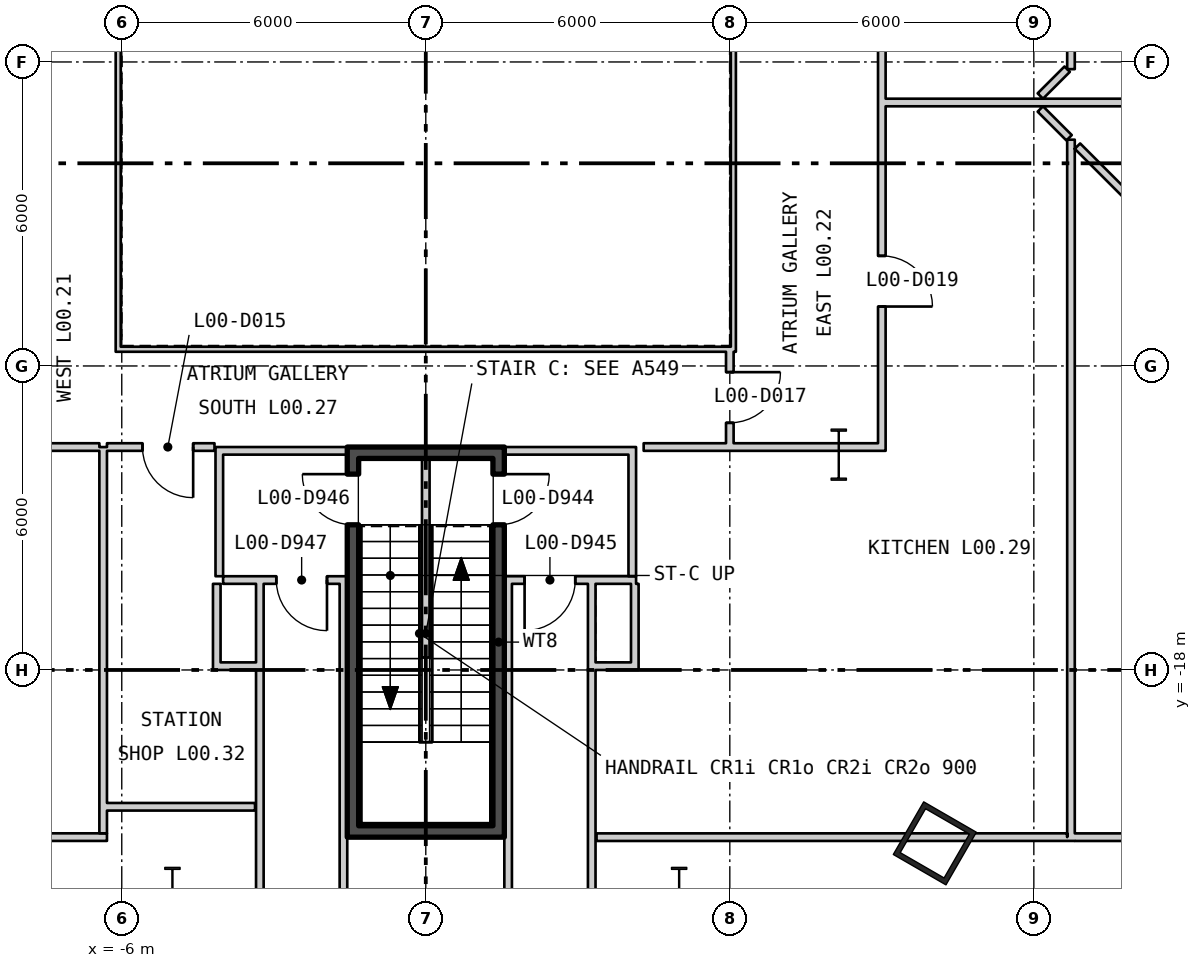
"""IFC4 building model, lengths in metres.
Left out: names, types, materials, properties, quantities, classifications, styles, units other than length and angle.
Written with IfcOpenShell. Run it as: python <this file> out.ifc"""

import sys

from ifc_helpers import new_model, si_unit, direction, frame, frame_2d, origin, origin_2d, place, context, subcontext, project, spatial, rectangle, hollow_rectangle, i_section, extrude, element, fill, save


model = new_model("IFC4")
c1 = context("Model", 3, precision=1e-05, world=origin(), true_north=direction((0.0, 1.0)))
c2 = subcontext(c1, "Body", "Model", "MODEL_VIEW")
j1 = project(units=[si_unit("LENGTHUNIT", "METRE"), si_unit("PLANEANGLEUNIT", "RADIAN")], contexts=[c1])
p1 = place(None, origin())
s1 = spatial("IfcSite", under=j1, at=p1, CompositionType="ELEMENT")
p2 = place(p1, origin())
s2 = spatial("IfcBuilding", under=s1, at=p2, CompositionType="ELEMENT")
p3 = place(p2, origin())
s3 = spatial("IfcBuildingStorey", under=s2, at=p3, CompositionType="ELEMENT", Elevation=0.0)
p4 = place(p3, frame((10.046, -21.422, 0.0), z_axis=(0.0, 0.0, 1.0), x_axis=(0.5, 0.866025403784, 0.0)))
e1 = element("IfcColumn", 1, at=p4, inside=s3, PredefinedType="COLUMN", context=c2, shape_type="SweptSolid", body=[
    extrude(hollow_rectangle(XDim=1.2, YDim=1.2, WallThickness=0.1, at=origin_2d()), origin(), (0.0, 0.0, 1.0), 8.4),
])
for number, where, z_axis, x_axis in (
    (2, (8.15, -13.75, 0.0), (0.0, 0.0, 1.0), (1.0, 0.0, 0.0)),
    (3, (5.0, -22.4, 0.0), (0.0, 0.0, 1.0), (1.0, 0.0, 0.0)),
    (4, (-5.0, -22.4, 0.0), (0.0, 0.0, 1.0), (1.0, 0.0, 0.0)),
):
    element("IfcColumn", number, at=place(p3, frame(where, z_axis=z_axis, x_axis=x_axis)), inside=s3, PredefinedType="COLUMN", context=c2, shape_type="SweptSolid", body=[
        extrude(i_section(OverallWidth=0.302, OverallDepth=1.008, WebThickness=0.021, FlangeThickness=0.04, at=origin_2d()), origin(), (0.0, 0.0, 1.0), 8.4),
    ])
p5 = place(p3, frame((-6.12, -11.67, 0.0), z_axis=(0.0, 0.0, 1.0), x_axis=(1.0, 0.0, 0.0)))
e5 = element("IfcWall", 5, at=p5, inside=s3, PredefinedType="PARTITIONING", context=c2, shape_type="SweptSolid", body=[
    extrude(rectangle(XDim=12.24, YDim=0.1, at=frame_2d((6.12, 0.0))), origin(), (0.0, 0.0, 1.0), 8.18),
])
for number, where, z_axis, x_axis in (
    (6, (6.07, -11.62, 0.0), (0.0, 0.0, 1.0), (0.0, 1.0, 0.0)),
    (7, (-6.07, -3.58, 0.0), (0.0, 0.0, 1.0), (0.0, -1.0, 0.0)),
):
    element("IfcWall", number, at=place(p3, frame(where, z_axis=z_axis, x_axis=x_axis)), inside=s3, PredefinedType="PARTITIONING", context=c2, shape_type="SweptSolid", body=[
        extrude(rectangle(XDim=8.04, YDim=0.1, at=frame_2d((4.02, 0.0))), origin(), (0.0, 0.0, 1.0), 8.18),
    ])
p6 = place(p3, frame((-1.438, -21.075, 0.0), z_axis=(0.0, 0.0, 1.0), x_axis=(0.0, 1.0, 0.0)))
e8 = element("IfcWall", 8, at=p6, inside=s3, PredefinedType="SHEAR", context=c2, shape_type="SweptSolid", body=[
    extrude(rectangle(XDim=7.25, YDim=0.225, at=frame_2d((3.625, 0.0))), origin(), (0.0, 0.0, 1.0), 8.18),
])
p7 = place(p6, frame((5.94, 0.0, 0.0)))
e9 = element("IfcOpeningElement", 9, at=p7, cuts=e8, PredefinedType="OPENING", context=c2, shape_type="SweptSolid", body=[
    extrude(rectangle(XDim=1.0, YDim=2.1, at=frame_2d((0.5, 1.05))), frame((0.0, 0.122, 0.0), z_axis=(0.0, -1.0, 0.0), x_axis=(1.0, 0.0, 0.0)), (0.0, 0.0, 1.0), 0.245),
])
p8 = place(p3, frame((1.438, -21.075, 0.0), z_axis=(0.0, 0.0, 1.0), x_axis=(0.0, 1.0, 0.0)))
e10 = element("IfcWall", 10, at=p8, inside=s3, PredefinedType="SHEAR", context=c2, shape_type="SweptSolid", body=[
    extrude(rectangle(XDim=7.25, YDim=0.225, at=frame_2d((3.625, 0.0))), origin(), (0.0, 0.0, 1.0), 8.18),
])
p9 = place(p8, frame((5.94, 0.0, 0.0)))
e11 = element("IfcOpeningElement", 11, at=p9, cuts=e10, PredefinedType="OPENING", context=c2, shape_type="SweptSolid", body=[
    extrude(rectangle(XDim=1.0, YDim=2.1, at=frame_2d((0.5, 1.05))), frame((0.0, 0.122, 0.0), z_axis=(0.0, -1.0, 0.0), x_axis=(1.0, 0.0, 0.0)), (0.0, 0.0, 1.0), 0.245),
])
for number, where, z_axis, x_axis in (
    (12, (-1.55, -21.188, 0.0), (0.0, 0.0, 1.0), (1.0, 0.0, 0.0)),
    (13, (-1.55, -13.713, 0.0), (0.0, 0.0, 1.0), (1.0, 0.0, 0.0)),
):
    element("IfcWall", number, at=place(p3, frame(where, z_axis=z_axis, x_axis=x_axis)), inside=s3, PredefinedType="SHEAR", context=c2, shape_type="SweptSolid", body=[
        extrude(rectangle(XDim=3.1, YDim=0.225, at=frame_2d((1.55, 0.0))), origin(), (0.0, 0.0, 1.0), 8.18),
    ])
p10 = place(p3, frame((0.0, -17.755, 0.0), z_axis=(0.0, 0.0, 1.0), x_axis=(0.0, 1.0, 0.0)))
e14 = element("IfcWall", 14, at=p10, inside=s3, PredefinedType="PARTITIONING", context=c2, shape_type="SweptSolid", body=[
    extrude(rectangle(XDim=3.93, YDim=0.15, at=frame_2d((1.965, 0.0))), origin(), (0.0, 0.0, 1.0), 4.0),
])
p11 = place(p3, frame((1.55, -16.225, 0.0), z_axis=(0.0, 0.0, 1.0), x_axis=(1.0, 0.0, 0.0)))
e15 = element("IfcWall", 15, at=p11, inside=s3, PredefinedType="PARTITIONING", context=c2, shape_type="SweptSolid", body=[
    extrude(rectangle(XDim=2.6, YDim=0.15, at=frame_2d((1.3, 0.0))), origin(), (0.0, 0.0, 1.0), 8.18),
])
p12 = place(p11, frame((0.4, 0.0, 0.0)))
e16 = element("IfcOpeningElement", 16, at=p12, cuts=e15, PredefinedType="OPENING", context=c2, shape_type="SweptSolid", body=[
    extrude(rectangle(XDim=1.0, YDim=2.4, at=frame_2d((0.5, 1.2))), frame((0.0, 0.085, 0.0), z_axis=(0.0, -1.0, 0.0), x_axis=(1.0, 0.0, 0.0)), (0.0, 0.0, 1.0), 0.17),
])
p13 = place(p3, frame((4.075, -16.15, 0.0), z_axis=(0.0, 0.0, 1.0), x_axis=(0.0, 1.0, 0.0)))
e17 = element("IfcWall", 17, at=p13, inside=s3, PredefinedType="PARTITIONING", context=c2, shape_type="SweptSolid", body=[
    extrude(rectangle(XDim=2.4, YDim=0.15, at=frame_2d((1.2, 0.0))), origin(), (0.0, 0.0, 1.0), 8.18),
])
p14 = place(p3, frame((1.55, -13.675, 0.0), z_axis=(0.0, 0.0, 1.0), x_axis=(1.0, 0.0, 0.0)))
e18 = element("IfcWall", 18, at=p14, inside=s3, PredefinedType="PARTITIONING", context=c2, shape_type="SweptSolid", body=[
    extrude(rectangle(XDim=2.6, YDim=0.15, at=frame_2d((1.3, 0.0))), origin(), (0.0, 0.0, 1.0), 7.27),
])
p15 = place(p3, frame((3.35, -17.925, 0.0), z_axis=(0.0, 0.0, 1.0), x_axis=(1.0, 0.0, 0.0)))
e19 = element("IfcWall", 19, at=p15, inside=s3, PredefinedType="PARTITIONING", context=c2, shape_type="SweptSolid", body=[
    extrude(rectangle(XDim=0.7, YDim=0.15, at=frame_2d((0.35, 0.0))), origin(), (0.0, 0.0, 1.0), 8.18),
])
p16 = place(p3, frame((4.125, -18.0, 0.0), z_axis=(0.0, 0.0, 1.0), x_axis=(0.0, 1.0, 0.0)))
e20 = element("IfcWall", 20, at=p16, inside=s3, PredefinedType="PARTITIONING", context=c2, shape_type="SweptSolid", body=[
    extrude(rectangle(XDim=1.7, YDim=0.15, at=frame_2d((0.85, 0.0))), origin(), (0.0, 0.0, 1.0), 8.18),
])
p17 = place(p3, frame((1.625, -33.35, 0.0), z_axis=(0.0, 0.0, 1.0), x_axis=(0.0, 1.0, 0.0)))
e21 = element("IfcWall", 21, at=p17, inside=s3, PredefinedType="PARTITIONING", context=c2, shape_type="SweptSolid", body=[
    extrude(rectangle(XDim=17.05, YDim=0.15, at=frame_2d((8.525, 0.0))), origin(), (0.0, 0.0, 1.0), 8.18),
])
p18 = place(p3, frame((3.275, -32.9, 0.0), z_axis=(0.0, 0.0, 1.0), x_axis=(0.0, 1.0, 0.0)))
e22 = element("IfcWall", 22, at=p18, inside=s3, PredefinedType="PARTITIONING", context=c2, shape_type="SweptSolid", body=[
    extrude(rectangle(XDim=16.6, YDim=0.15, at=frame_2d((8.3, 0.0))), origin(), (0.0, 0.0, 1.0), 7.58),
])
p19 = place(p3, frame((-4.0, -16.225, 0.0), z_axis=(0.0, 0.0, 1.0), x_axis=(1.0, 0.0, 0.0)))
e23 = element("IfcWall", 23, at=p19, inside=s3, PredefinedType="PARTITIONING", context=c2, shape_type="SweptSolid", body=[
    extrude(rectangle(XDim=2.45, YDim=0.15, at=frame_2d((1.225, 0.0))), origin(), (0.0, 0.0, 1.0), 8.18),
])
p20 = place(p19, frame((1.05, 0.0, 0.0)))
e24 = element("IfcOpeningElement", 24, at=p20, cuts=e23, PredefinedType="OPENING", context=c2, shape_type="SweptSolid", body=[
    extrude(rectangle(XDim=1.0, YDim=2.4, at=frame_2d((0.5, 1.2))), frame((0.0, 0.085, 0.0), z_axis=(0.0, -1.0, 0.0), x_axis=(1.0, 0.0, 0.0)), (0.0, 0.0, 1.0), 0.17),
])
p21 = place(p3, frame((-4.075, -16.15, 0.0), z_axis=(0.0, 0.0, 1.0), x_axis=(0.0, 1.0, 0.0)))
e25 = element("IfcWall", 25, at=p21, inside=s3, PredefinedType="PARTITIONING", context=c2, shape_type="SweptSolid", body=[
    extrude(rectangle(XDim=2.4, YDim=0.15, at=frame_2d((1.2, 0.0))), origin(), (0.0, 0.0, 1.0), 8.18),
])
p22 = place(p3, frame((-4.15, -13.675, 0.0), z_axis=(0.0, 0.0, 1.0), x_axis=(1.0, 0.0, 0.0)))
e26 = element("IfcWall", 26, at=p22, inside=s3, PredefinedType="PARTITIONING", context=c2, shape_type="SweptSolid", body=[
    extrude(rectangle(XDim=2.6, YDim=0.15, at=frame_2d((1.3, 0.0))), origin(), (0.0, 0.0, 1.0), 7.27),
])
p23 = place(p3, frame((-3.275, -32.9, 0.0), z_axis=(0.0, 0.0, 1.0), x_axis=(0.0, 1.0, 0.0)))
e27 = element("IfcWall", 27, at=p23, inside=s3, PredefinedType="PARTITIONING", context=c2, shape_type="SweptSolid", body=[
    extrude(rectangle(XDim=16.6, YDim=0.15, at=frame_2d((8.3, 0.0))), origin(), (0.0, 0.0, 1.0), 7.58),
])
p24 = place(p3, frame((-1.625, -33.35, 0.0), z_axis=(0.0, 0.0, 1.0), x_axis=(0.0, 1.0, 0.0)))
e28 = element("IfcWall", 28, at=p24, inside=s3, PredefinedType="PARTITIONING", context=c2, shape_type="SweptSolid", body=[
    extrude(rectangle(XDim=17.05, YDim=0.15, at=frame_2d((8.525, 0.0))), origin(), (0.0, 0.0, 1.0), 8.18),
])
p25 = place(p3, frame((-4.125, -18.0, 0.0), z_axis=(0.0, 0.0, 1.0), x_axis=(0.0, 1.0, 0.0)))
e29 = element("IfcWall", 29, at=p25, inside=s3, PredefinedType="PARTITIONING", context=c2, shape_type="SweptSolid", body=[
    extrude(rectangle(XDim=1.7, YDim=0.15, at=frame_2d((0.85, 0.0))), origin(), (0.0, 0.0, 1.0), 8.18),
])
p26 = place(p3, frame((-4.05, -17.925, 0.0), z_axis=(0.0, 0.0, 1.0), x_axis=(1.0, 0.0, 0.0)))
e30 = element("IfcWall", 30, at=p26, inside=s3, PredefinedType="PARTITIONING", context=c2, shape_type="SweptSolid", body=[
    extrude(rectangle(XDim=0.7, YDim=0.15, at=frame_2d((0.35, 0.0))), origin(), (0.0, 0.0, 1.0), 8.18),
])
p27 = place(p3, frame((-17.425, -21.3, 0.0), z_axis=(0.0, 0.0, 1.0), x_axis=(0.999999995966, 8.9823048e-05, 0.0)))
e31 = element("IfcWall", 31, at=p27, inside=s3, PredefinedType="PARTITIONING", context=c2, shape_type="SweptSolid", body=[
    extrude(rectangle(XDim=11.133, YDim=0.15, at=frame_2d((5.566, 0.0))), origin(), (0.0, 0.0, 1.0), 8.18),
])
p28 = place(p3, frame((-8.15, -13.6, 0.0), z_axis=(0.0, 0.0, 1.0), x_axis=(1.0, 0.0, 0.0)))
e32 = element("IfcWall", 32, at=p28, inside=s3, PredefinedType="PARTITIONING", context=c2, shape_type="SweptSolid", body=[
    extrude(rectangle(XDim=1.708, YDim=0.15, at=frame_2d((0.854, 0.0))), origin(), (0.0, 0.0, 1.0), 7.27),
])
p29 = place(p3, frame((-6.367, -21.224, 0.0), z_axis=(0.0, 0.0, 1.0), x_axis=(0.0, 1.0, 0.0)))
e33 = element("IfcWall", 33, at=p29, inside=s3, PredefinedType="PARTITIONING", context=c2, shape_type="SweptSolid", body=[
    extrude(rectangle(XDim=7.623, YDim=0.15, at=frame_2d((3.812, 0.0))), origin(), (0.0, 0.0, 1.0), 7.58),
])
p30 = place(p3, frame((-6.292, -20.7, 0.0), z_axis=(0.0, 0.0, 1.0), x_axis=(1.0, 0.0, 0.0)))
e34 = element("IfcWall", 34, at=p30, inside=s3, PredefinedType="PARTITIONING", context=c2, shape_type="SweptSolid", body=[
    extrude(rectangle(XDim=2.922, YDim=0.15, at=frame_2d((1.461, 0.0))), origin(), (0.0, 0.0, 1.0), 8.18),
])
p31 = place(p3, frame((-6.292, -13.6, 0.0), z_axis=(0.0, 0.0, 1.0), x_axis=(1.0, 0.0, 0.0)))
e35 = element("IfcWall", 35, at=p31, inside=s3, PredefinedType="PARTITIONING", context=c2, shape_type="SweptSolid", body=[
    extrude(rectangle(XDim=2.122, YDim=0.15, at=frame_2d((1.061, 0.0))), origin(), (0.0, 0.0, 1.0), 7.27),
])
p32 = place(p31, frame((0.701, 0.0, 0.0)))
e36 = element("IfcOpeningElement", 36, at=p32, cuts=e35, PredefinedType="OPENING", context=c2, shape_type="SweptSolid", body=[
    extrude(rectangle(XDim=1.0, YDim=2.1, at=frame_2d((0.5, 1.05))), frame((0.0, 0.085, 0.0), z_axis=(0.0, -1.0, 0.0), x_axis=(1.0, 0.0, 0.0)), (0.0, 0.0, 1.0), 0.17),
])
p33 = place(p3, frame((3.37, -21.3, 0.0), z_axis=(0.0, 0.0, 1.0), x_axis=(0.999999994204, 0.000107665805, 0.0)))
e37 = element("IfcWall", 37, at=p33, inside=s3, PredefinedType="PARTITIONING", context=c2, shape_type="SweptSolid", body=[
    extrude(rectangle(XDim=9.288, YDim=0.15, at=frame_2d((4.644, 0.0))), origin(), (0.0, 0.0, 1.0), 8.18),
])
p34 = place(p3, frame((4.3, -13.6, 0.0), z_axis=(0.0, 0.0, 1.0), x_axis=(1.0, 0.0, 0.0)))
e38 = element("IfcWall", 38, at=p34, inside=s3, PredefinedType="PARTITIONING", context=c2, shape_type="SweptSolid", body=[
    extrude(rectangle(XDim=3.85, YDim=0.15, at=frame_2d((1.925, 0.0))), origin(), (0.0, 0.0, 1.0), 7.27),
])
p35 = place(p3, frame((8.15, -13.6, 0.0), z_axis=(0.0, 0.0, 1.0), x_axis=(1.0, 0.0, 0.0)))
e39 = element("IfcWall", 39, at=p35, inside=s3, PredefinedType="PARTITIONING", context=c2, shape_type="SweptSolid", body=[
    extrude(rectangle(XDim=0.775, YDim=0.15, at=frame_2d((0.388, 0.0))), origin(), (0.0, 0.0, 1.0), 7.39),
])
p36 = place(p3, frame((6.0, -13.525, 0.0), z_axis=(0.0, 0.0, 1.0), x_axis=(0.0, 1.0, 0.0)))
e40 = element("IfcWall", 40, at=p36, inside=s3, PredefinedType="PARTITIONING", context=c2, shape_type="SweptSolid", body=[
    extrude(rectangle(XDim=1.805, YDim=0.15, at=frame_2d((0.902, 0.0))), origin(), (0.0, 0.0, 1.0), 8.18),
])
p37 = place(p36, frame((0.403, 0.0, 0.0)))
e41 = element("IfcOpeningElement", 41, at=p37, cuts=e40, PredefinedType="OPENING", context=c2, shape_type="SweptSolid", body=[
    extrude(rectangle(XDim=1.0, YDim=2.1, at=frame_2d((0.5, 1.05))), frame((0.0, 0.085, 0.0), z_axis=(0.0, -1.0, 0.0), x_axis=(1.0, 0.0, 0.0)), (0.0, 0.0, 1.0), 0.17),
])
p38 = place(p3, frame((9.0, -13.675, 0.0), z_axis=(0.0, 0.0, 1.0), x_axis=(0.0, 1.0, 0.0)))
e42 = element("IfcWall", 42, at=p38, inside=s3, PredefinedType="PARTITIONING", context=c2, shape_type="SweptSolid", body=[
    extrude(rectangle(XDim=11.287, YDim=0.15, at=frame_2d((5.644, 0.0))), origin(), (0.0, 0.0, 1.0), 8.18),
])
p39 = place(p38, frame((2.848, 0.0, 0.0)))
e43 = element("IfcOpeningElement", 43, at=p39, cuts=e42, PredefinedType="OPENING", context=c2, shape_type="SweptSolid", body=[
    extrude(rectangle(XDim=1.0, YDim=2.1, at=frame_2d((0.5, 1.05))), frame((0.0, 0.085, 0.0), z_axis=(0.0, -1.0, 0.0), x_axis=(1.0, 0.0, 0.0)), (0.0, 0.0, 1.0), 0.17),
])
p40 = place(p3, frame((9.075, -6.8, 0.0), z_axis=(0.0, 0.0, 1.0), x_axis=(1.0, 0.0, 0.0)))
e44 = element("IfcWall", 44, at=p40, inside=s3, PredefinedType="PARTITIONING", context=c2, shape_type="SweptSolid", body=[
    extrude(rectangle(XDim=7.95, YDim=0.15, at=frame_2d((3.975, 0.0))), origin(), (0.0, 0.0, 1.0), 8.18),
])
p41 = place(p3, frame((12.128, -6.928, 0.0), z_axis=(0.0, 0.0, 1.0), x_axis=(0.707106781187, -0.707106781187, 0.0)))
e45 = element("IfcWall", 45, at=p41, inside=s3, PredefinedType="PARTITIONING", context=c2, shape_type="SweptSolid", body=[
    extrude(rectangle(XDim=0.803, YDim=0.15, at=frame_2d((0.402, 0.0))), origin(), (0.0, 0.0, 1.0), 8.18),
])
p42 = place(p3, frame((12.128, -6.672, 0.0), z_axis=(0.0, 0.0, 1.0), x_axis=(0.707106781187, 0.707106781187, 0.0)))
e46 = element("IfcWall", 46, at=p42, inside=s3, PredefinedType="PARTITIONING", context=c2, shape_type="SweptSolid", body=[
    extrude(rectangle(XDim=0.75, YDim=0.15, at=frame_2d((0.375, 0.0))), origin(), (0.0, 0.0, 1.0), 8.18),
])
p43 = place(p3, frame((12.733, -21.374, 0.0), z_axis=(0.0, 0.0, 1.0), x_axis=(0.0, 1.0, 0.0)))
e47 = element("IfcWall", 47, at=p43, inside=s3, PredefinedType="PARTITIONING", context=c2, shape_type="SweptSolid", body=[
    extrude(rectangle(XDim=1.575, YDim=0.15, at=frame_2d((0.787, 0.0))), origin(), (0.0, 0.0, 1.0), 7.49),
])
p44 = place(p3, frame((12.733, -19.799, 0.0), z_axis=(0.0, 0.0, 1.0), x_axis=(0.0, 1.0, 0.0)))
e48 = element("IfcWall", 48, at=p44, inside=s3, PredefinedType="PARTITIONING", context=c2, shape_type="SweptSolid", body=[
    extrude(rectangle(XDim=2.832, YDim=0.15, at=frame_2d((1.416, 0.0))), origin(), (0.0, 0.0, 1.0), 7.58),
])
p45 = place(p3, frame((12.733, -16.967, 0.0), z_axis=(0.0, 0.0, 1.0), x_axis=(0.0, 1.0, 0.0)))
e49 = element("IfcWall", 49, at=p45, inside=s3, PredefinedType="PARTITIONING", context=c2, shape_type="SweptSolid", body=[
    extrude(rectangle(XDim=0.4, YDim=0.15, at=frame_2d((0.2, 0.0))), origin(), (0.0, 0.0, 1.0), 8.18),
])
p46 = place(p3, frame((12.733, -16.567, 0.0), z_axis=(0.0, 0.0, 1.0), x_axis=(0.0, 1.0, 0.0)))
e50 = element("IfcWall", 50, at=p46, inside=s3, PredefinedType="PARTITIONING", context=c2, shape_type="SweptSolid", body=[
    extrude(rectangle(XDim=2.717, YDim=0.15, at=frame_2d((1.359, 0.0))), origin(), (0.0, 0.0, 1.0), 7.58),
])
p47 = place(p3, frame((12.733, -13.85, 0.0), z_axis=(0.0, 0.0, 1.0), x_axis=(0.0, 1.0, 0.0)))
e51 = element("IfcWall", 51, at=p47, inside=s3, PredefinedType="PARTITIONING", context=c2, shape_type="SweptSolid", body=[
    extrude(rectangle(XDim=6.316, YDim=0.15, at=frame_2d((3.158, 0.0))), origin(), (0.0, 0.0, 1.0), 7.49),
])
p48 = place(p3, frame((12.733, -6.142, 0.0), z_axis=(0.0, 0.0, 1.0), x_axis=(0.0, 1.0, 0.0)))
e52 = element("IfcWall", 52, at=p48, inside=s3, PredefinedType="PARTITIONING", context=c2, shape_type="SweptSolid", body=[
    extrude(rectangle(XDim=3.042, YDim=0.15, at=frame_2d((1.521, 0.0))), origin(), (0.0, 0.0, 1.0), 7.49),
])
p49 = place(p3, frame((12.808, -21.3, 0.0), z_axis=(0.0, 0.0, 1.0), x_axis=(1.0, 0.0, 0.0)))
e53 = element("IfcWall", 53, at=p49, inside=s3, PredefinedType="PARTITIONING", context=c2, shape_type="SweptSolid", body=[
    extrude(rectangle(XDim=4.617, YDim=0.15, at=frame_2d((2.308, 0.0))), origin(), (0.0, 0.0, 1.0), 8.18),
])
p50 = place(p49, frame((1.758, 0.0, 0.0)))
e54 = element("IfcOpeningElement", 54, at=p50, cuts=e53, PredefinedType="OPENING", context=c2, shape_type="SweptSolid", body=[
    extrude(rectangle(XDim=1.0, YDim=2.1, at=frame_2d((0.5, 1.05))), frame((0.0, 0.085, 0.0), z_axis=(0.0, -1.0, 0.0), x_axis=(1.0, 0.0, 0.0)), (0.0, 0.0, 1.0), 0.17),
])
p51 = place(p3, frame((12.861, -7.661, 0.0), z_axis=(0.0, 0.0, 1.0), x_axis=(0.707106781187, -0.707106781187, 0.0)))
e55 = element("IfcWall", 55, at=p51, inside=s3, PredefinedType="PARTITIONING", context=c2, shape_type="SweptSolid", body=[
    extrude(rectangle(XDim=5.814, YDim=0.15, at=frame_2d((2.907, 0.0))), origin(), (0.0, 0.0, 1.0), 8.18),
])
p52 = place(p9, origin())
e56 = element("IfcDoor", 56, at=p52, inside=s3, OperationType="SINGLE_SWING_RIGHT", PredefinedType="DOOR", context=c2, shape_type="SweptSolid", body=[
    extrude(rectangle(XDim=1.0, YDim=2.1, at=frame_2d((0.5, 1.05))), frame((0.0, 0.025, 0.0), z_axis=(0.0, -1.0, 0.0), x_axis=(1.0, 0.0, 0.0)), (0.0, 0.0, 1.0), 0.05),
])
fill(e11, e56)
p53 = place(p12, origin())
e57 = element("IfcDoor", 57, at=p53, inside=s3, OperationType="SINGLE_SWING_LEFT", PredefinedType="DOOR", context=c2, shape_type="SweptSolid", body=[
    extrude(rectangle(XDim=1.0, YDim=2.4, at=frame_2d((0.5, 1.2))), frame((0.0, 0.025, 0.0), z_axis=(0.0, -1.0, 0.0), x_axis=(1.0, 0.0, 0.0)), (0.0, 0.0, 1.0), 0.05),
])
fill(e16, e57)
p54 = place(p7, origin())
e58 = element("IfcDoor", 58, at=p54, inside=s3, OperationType="SINGLE_SWING_LEFT", PredefinedType="DOOR", context=c2, shape_type="SweptSolid", body=[
    extrude(rectangle(XDim=1.0, YDim=2.1, at=frame_2d((0.5, 1.05))), frame((0.0, 0.025, 0.0), z_axis=(0.0, -1.0, 0.0), x_axis=(1.0, 0.0, 0.0)), (0.0, 0.0, 1.0), 0.05),
])
fill(e9, e58)
p55 = place(p20, origin())
e59 = element("IfcDoor", 59, at=p55, inside=s3, OperationType="SINGLE_SWING_RIGHT", PredefinedType="DOOR", context=c2, shape_type="SweptSolid", body=[
    extrude(rectangle(XDim=1.0, YDim=2.4, at=frame_2d((0.5, 1.2))), frame((0.0, 0.025, 0.0), z_axis=(0.0, -1.0, 0.0), x_axis=(1.0, 0.0, 0.0)), (0.0, 0.0, 1.0), 0.05),
])
fill(e24, e59)
p56 = place(p32, origin())
e60 = element("IfcDoor", 60, at=p56, inside=s3, OperationType="SINGLE_SWING_RIGHT", PredefinedType="DOOR", context=c2, shape_type="SweptSolid", body=[
    extrude(rectangle(XDim=1.0, YDim=2.1, at=frame_2d((0.5, 1.05))), frame((0.0, 0.025, 0.0), z_axis=(0.0, -1.0, 0.0), x_axis=(1.0, 0.0, 0.0)), (0.0, 0.0, 1.0), 0.05),
])
fill(e36, e60)
p57 = place(p37, origin())
e61 = element("IfcDoor", 61, at=p57, inside=s3, OperationType="SINGLE_SWING_RIGHT", PredefinedType="DOOR", context=c2, shape_type="SweptSolid", body=[
    extrude(rectangle(XDim=1.0, YDim=2.1, at=frame_2d((0.5, 1.05))), frame((0.0, 0.025, 0.0), z_axis=(0.0, -1.0, 0.0), x_axis=(1.0, 0.0, 0.0)), (0.0, 0.0, 1.0), 0.05),
])
fill(e41, e61)
p58 = place(p39, origin())
e62 = element("IfcDoor", 62, at=p58, inside=s3, OperationType="SINGLE_SWING_LEFT", PredefinedType="DOOR", context=c2, shape_type="SweptSolid", body=[
    extrude(rectangle(XDim=1.0, YDim=2.1, at=frame_2d((0.5, 1.05))), frame((0.0, 0.025, 0.0), z_axis=(0.0, -1.0, 0.0), x_axis=(1.0, 0.0, 0.0)), (0.0, 0.0, 1.0), 0.05),
])
fill(e43, e62)
save(model, sys.argv[1])
